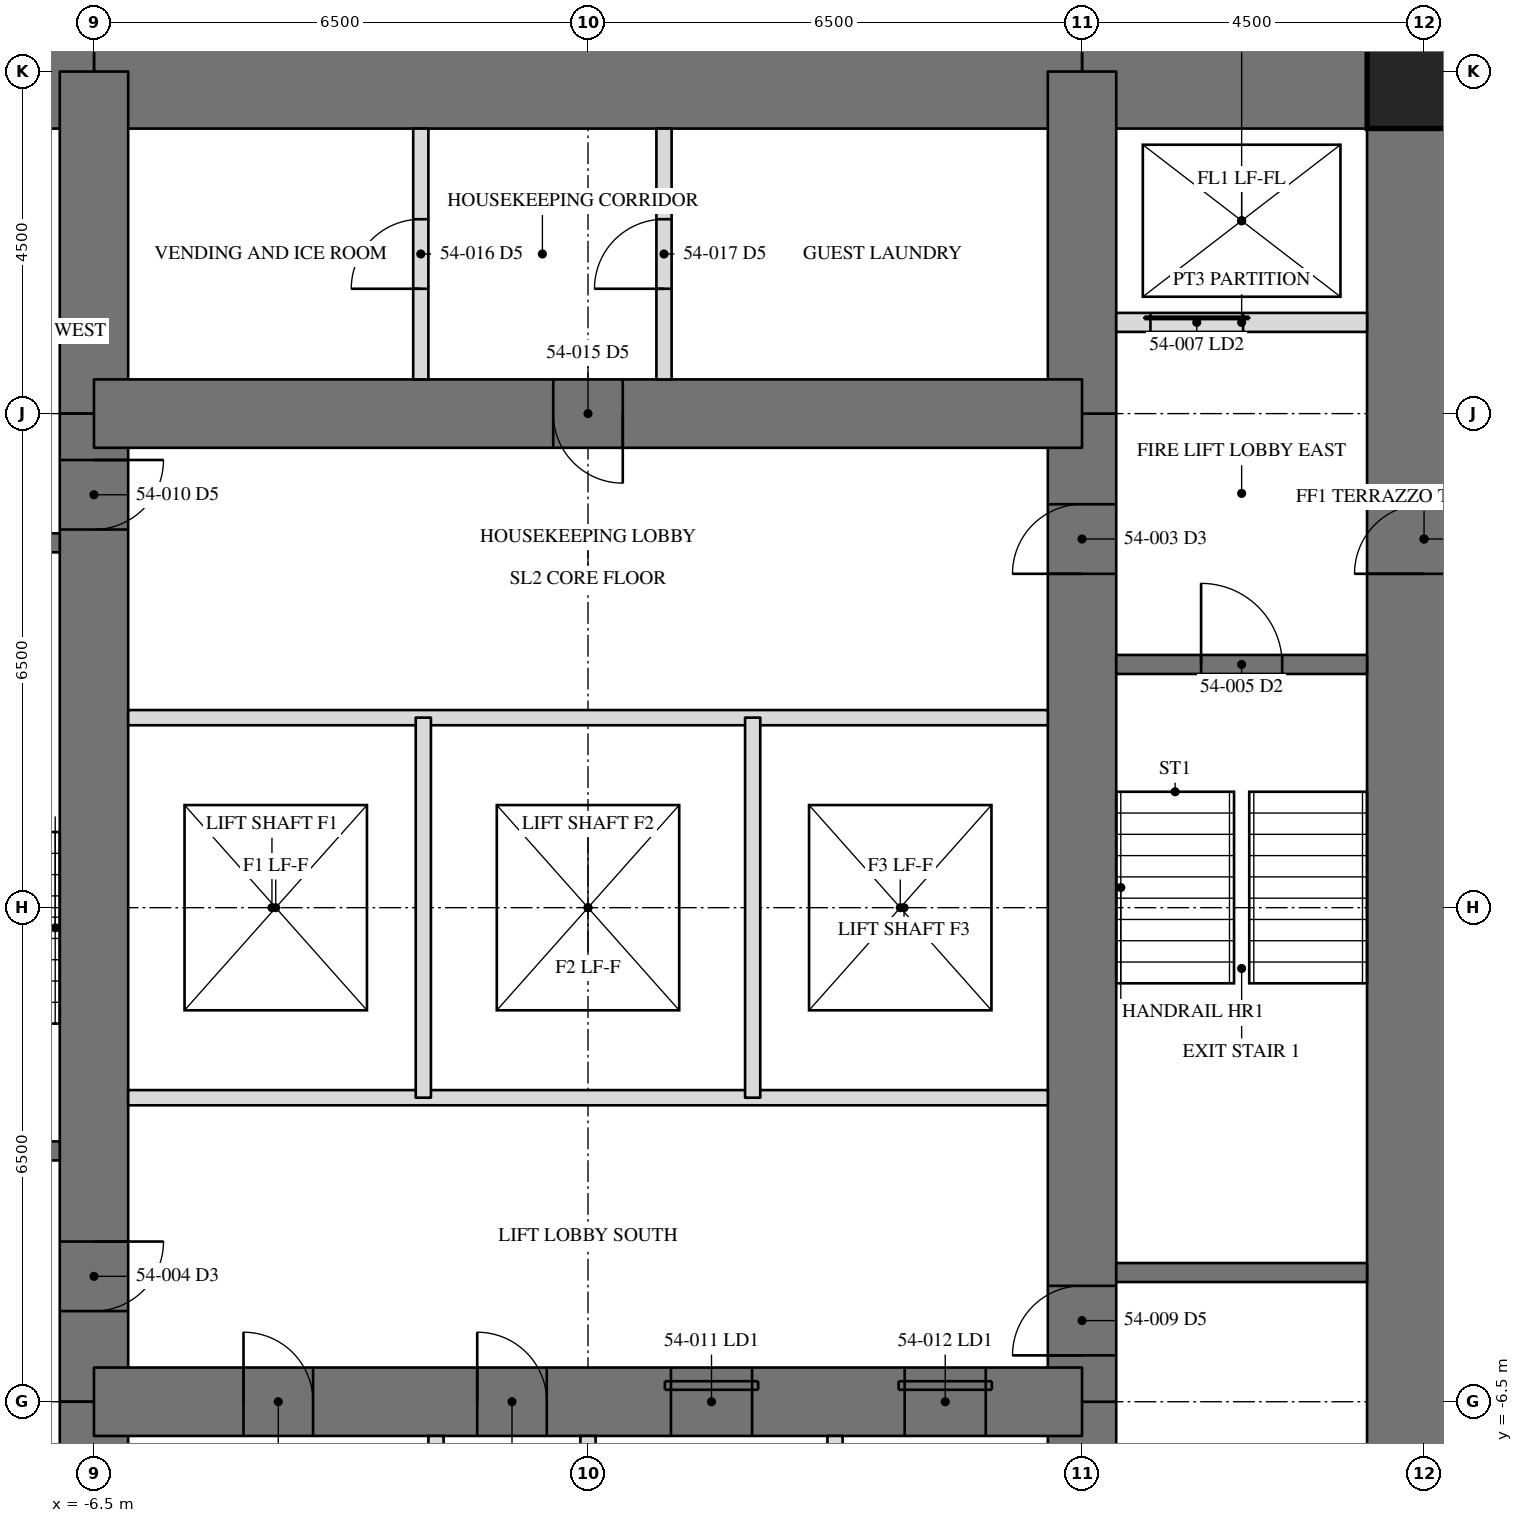
"""IFC4 building model, lengths in metres.
Left out: names, types, materials, properties, quantities, classifications, styles, units other than length and angle.
Written with IfcOpenShell. Run it as: python <this file> out.ifc"""

import sys

from ifc_helpers import new_model, si_unit, direction, frame, frame_2d, origin, origin_2d, place, context, subcontext, project, spatial, rectangle, hollow_rectangle, extrude, element, fill, save


model = new_model("IFC4")
c1 = context("Model", 3, precision=1e-05, world=origin(), true_north=direction((0.0, 1.0)))
c2 = subcontext(c1, "Body", "Model", "MODEL_VIEW")
j1 = project(units=[si_unit("LENGTHUNIT", "METRE"), si_unit("PLANEANGLEUNIT", "RADIAN")], contexts=[c1])
p1 = place(None, origin())
s1 = spatial("IfcSite", under=j1, at=p1, CompositionType="ELEMENT")
p2 = place(p1, origin())
s2 = spatial("IfcBuilding", under=s1, at=p2, CompositionType="ELEMENT")
p3 = place(p2, frame((0.0, 0.0, 225.7)))
s3 = spatial("IfcBuildingStorey", under=s2, at=p3, CompositionType="ELEMENT", Elevation=225.7)
p4 = place(p3, frame((11.0, -11.0, 0.0), z_axis=(0.0, 0.0, 1.0), x_axis=(0.0, 1.0, 0.0)))
e1 = element("IfcWall", 1, at=p4, inside=s3, PredefinedType="SHEAR", context=c2, shape_type="SweptSolid", body=[
    extrude(rectangle(XDim=22.0, YDim=1.5, at=frame_2d((11.0, 0.0))), origin(), (0.0, 0.0, 1.0), 3.5),
])
p5 = place(p4, frame((15.393, 0.0, 0.0)))
e2 = element("IfcOpeningElement", 2, at=p5, cuts=e1, PredefinedType="OPENING", context=c2, shape_type="SweptSolid", body=[
    extrude(rectangle(XDim=0.915, YDim=2.134, at=frame_2d((0.458, 1.067))), frame((0.0, 0.76, 0.0), z_axis=(0.0, -1.0, 0.0), x_axis=(1.0, 0.0, 0.0)), (0.0, 0.0, 1.0), 1.52),
])
p6 = place(p3, frame((11.0, 11.0, 0.0), z_axis=(0.0, 0.0, 1.0), x_axis=(-1.0, 0.0, 0.0)))
e3 = element("IfcWall", 3, at=p6, inside=s3, PredefinedType="SHEAR", context=c2, shape_type="SweptSolid", body=[
    extrude(rectangle(XDim=4.5, YDim=1.5, at=frame_2d((2.25, 0.0))), origin(), (0.0, 0.0, 1.0), 3.5),
])
p7 = place(p3, frame((6.5, 11.0, 0.0), z_axis=(0.0, 0.0, 1.0), x_axis=(-1.0, 0.0, 0.0)))
e4 = element("IfcWall", 4, at=p7, inside=s3, PredefinedType="SHEAR", context=c2, shape_type="SweptSolid", body=[
    extrude(rectangle(XDim=13.0, YDim=1.5, at=frame_2d((6.5, 0.0))), origin(), (0.0, 0.0, 1.0), 3.5),
])
p8 = place(p3, frame((-6.5, 11.0, 0.0), z_axis=(0.0, 0.0, 1.0), x_axis=(-1.0, 0.0, 0.0)))
e5 = element("IfcWall", 5, at=p8, inside=s3, PredefinedType="SHEAR", context=c2, shape_type="SweptSolid", body=[
    extrude(rectangle(XDim=4.5, YDim=1.5, at=frame_2d((2.25, 0.0))), origin(), (0.0, 0.0, 1.0), 3.5),
])
p9 = place(p3, frame((6.5, -11.0, 0.0), z_axis=(0.0, 0.0, 1.0), x_axis=(0.0, 1.0, 0.0)))
e6 = element("IfcWall", 6, at=p9, inside=s3, PredefinedType="SHEAR", context=c2, shape_type="SweptSolid", body=[
    extrude(rectangle(XDim=4.5, YDim=0.9, at=frame_2d((2.25, 0.0))), origin(), (0.0, 0.0, 1.0), 3.5),
])
p10 = place(p3, frame((6.5, -6.5, 0.0), z_axis=(0.0, 0.0, 1.0), x_axis=(0.0, 1.0, 0.0)))
e7 = element("IfcWall", 7, at=p10, inside=s3, PredefinedType="SHEAR", context=c2, shape_type="SweptSolid", body=[
    extrude(rectangle(XDim=13.0, YDim=0.9, at=frame_2d((6.5, 0.0))), origin(), (0.0, 0.0, 1.0), 3.5),
])
p11 = place(p10, frame((10.893, 0.0, 0.0)))
e8 = element("IfcOpeningElement", 8, at=p11, cuts=e7, PredefinedType="OPENING", context=c2, shape_type="SweptSolid", body=[
    extrude(rectangle(XDim=0.915, YDim=2.134, at=frame_2d((0.458, 1.067))), frame((0.0, 0.46, 0.0), z_axis=(0.0, -1.0, 0.0), x_axis=(1.0, 0.0, 0.0)), (0.0, 0.0, 1.0), 0.92),
])
p12 = place(p10, frame((0.61, 0.0, 0.0)))
e9 = element("IfcOpeningElement", 9, at=p12, cuts=e7, PredefinedType="OPENING", context=c2, shape_type="SweptSolid", body=[
    extrude(rectangle(XDim=0.915, YDim=2.134, at=frame_2d((0.458, 1.067))), frame((0.0, 0.46, 0.0), z_axis=(0.0, -1.0, 0.0), x_axis=(1.0, 0.0, 0.0)), (0.0, 0.0, 1.0), 0.92),
])
for number, where, z_axis, x_axis in (
    (10, (6.5, 6.5, 0.0), (0.0, 0.0, 1.0), (0.0, 1.0, 0.0)),
    (11, (-6.5, 11.0, 0.0), (0.0, 0.0, 1.0), (0.0, -1.0, 0.0)),
):
    element("IfcWall", number, at=place(p3, frame(where, z_axis=z_axis, x_axis=x_axis)), inside=s3, PredefinedType="SHEAR", context=c2, shape_type="SweptSolid", body=[
        extrude(rectangle(XDim=4.5, YDim=0.9, at=frame_2d((2.25, 0.0))), origin(), (0.0, 0.0, 1.0), 3.5),
    ])
p13 = place(p3, frame((-6.5, 6.5, 0.0), z_axis=(0.0, 0.0, 1.0), x_axis=(0.0, -1.0, 0.0)))
e12 = element("IfcWall", 12, at=p13, inside=s3, PredefinedType="SHEAR", context=c2, shape_type="SweptSolid", body=[
    extrude(rectangle(XDim=13.0, YDim=0.9, at=frame_2d((6.5, 0.0))), origin(), (0.0, 0.0, 1.0), 3.5),
])
p14 = place(p13, frame((10.893, 0.0, 0.0)))
e13 = element("IfcOpeningElement", 13, at=p14, cuts=e12, PredefinedType="OPENING", context=c2, shape_type="SweptSolid", body=[
    extrude(rectangle(XDim=0.915, YDim=2.134, at=frame_2d((0.458, 1.067))), frame((0.0, 0.46, 0.0), z_axis=(0.0, -1.0, 0.0), x_axis=(1.0, 0.0, 0.0)), (0.0, 0.0, 1.0), 0.92),
])
p15 = place(p13, frame((0.61, 0.0, 0.0)))
e14 = element("IfcOpeningElement", 14, at=p15, cuts=e12, PredefinedType="OPENING", context=c2, shape_type="SweptSolid", body=[
    extrude(rectangle(XDim=0.915, YDim=2.134, at=frame_2d((0.458, 1.067))), frame((0.0, 0.46, 0.0), z_axis=(0.0, -1.0, 0.0), x_axis=(1.0, 0.0, 0.0)), (0.0, 0.0, 1.0), 0.92),
])
p16 = place(p3, frame((-6.5, -6.5, 0.0), z_axis=(0.0, 0.0, 1.0), x_axis=(0.0, -1.0, 0.0)))
e15 = element("IfcWall", 15, at=p16, inside=s3, PredefinedType="SHEAR", context=c2, shape_type="SweptSolid", body=[
    extrude(rectangle(XDim=4.5, YDim=0.9, at=frame_2d((2.25, 0.0))), origin(), (0.0, 0.0, 1.0), 3.5),
])
p17 = place(p3, frame((6.5, 6.5, 0.0), z_axis=(0.0, 0.0, 1.0), x_axis=(-1.0, 0.0, 0.0)))
e16 = element("IfcWall", 16, at=p17, inside=s3, PredefinedType="SHEAR", context=c2, shape_type="SweptSolid", body=[
    extrude(rectangle(XDim=13.0, YDim=0.9, at=frame_2d((6.5, 0.0))), origin(), (0.0, 0.0, 1.0), 3.5),
])
p18 = place(p17, frame((6.042, 0.0, 0.0)))
e17 = element("IfcOpeningElement", 17, at=p18, cuts=e16, PredefinedType="OPENING", context=c2, shape_type="SweptSolid", body=[
    extrude(rectangle(XDim=0.915, YDim=2.134, at=frame_2d((0.458, 1.067))), frame((0.0, 0.46, 0.0), z_axis=(0.0, -1.0, 0.0), x_axis=(1.0, 0.0, 0.0)), (0.0, 0.0, 1.0), 0.92),
])
p19 = place(p3, frame((-6.5, -6.5, 0.0), z_axis=(0.0, 0.0, 1.0), x_axis=(1.0, 0.0, 0.0)))
e18 = element("IfcWall", 18, at=p19, inside=s3, PredefinedType="SHEAR", context=c2, shape_type="SweptSolid", body=[
    extrude(rectangle(XDim=13.0, YDim=0.9, at=frame_2d((6.5, 0.0))), origin(), (0.0, 0.0, 1.0), 3.5),
])
p20 = place(p19, frame((7.592, 0.0, 0.0)))
e19 = element("IfcOpeningElement", 19, at=p20, cuts=e18, PredefinedType="OPENING", context=c2, shape_type="SweptSolid", body=[
    extrude(rectangle(XDim=1.067, YDim=2.134, at=frame_2d((0.533, 1.067))), frame((0.0, 0.46, 0.0), z_axis=(0.0, -1.0, 0.0), x_axis=(1.0, 0.0, 0.0)), (0.0, 0.0, 1.0), 0.92),
])
p21 = place(p19, frame((10.667, 0.0, 0.0)))
e20 = element("IfcOpeningElement", 20, at=p21, cuts=e18, PredefinedType="OPENING", context=c2, shape_type="SweptSolid", body=[
    extrude(rectangle(XDim=1.067, YDim=2.134, at=frame_2d((0.533, 1.067))), frame((0.0, 0.46, 0.0), z_axis=(0.0, -1.0, 0.0), x_axis=(1.0, 0.0, 0.0)), (0.0, 0.0, 1.0), 0.92),
])
p22 = place(p19, frame((1.968, 0.0, 0.0)))
e21 = element("IfcOpeningElement", 21, at=p22, cuts=e18, PredefinedType="OPENING", context=c2, shape_type="SweptSolid", body=[
    extrude(rectangle(XDim=0.915, YDim=2.134, at=frame_2d((0.458, 1.067))), frame((0.0, 0.46, 0.0), z_axis=(0.0, -1.0, 0.0), x_axis=(1.0, 0.0, 0.0)), (0.0, 0.0, 1.0), 0.92),
])
p23 = place(p19, frame((5.042, 0.0, 0.0)))
e22 = element("IfcOpeningElement", 22, at=p23, cuts=e18, PredefinedType="OPENING", context=c2, shape_type="SweptSolid", body=[
    extrude(rectangle(XDim=0.915, YDim=2.134, at=frame_2d((0.458, 1.067))), frame((0.0, 0.46, 0.0), z_axis=(0.0, -1.0, 0.0), x_axis=(1.0, 0.0, 0.0)), (0.0, 0.0, 1.0), 0.92),
])
p24 = place(p3, frame((11.0, 11.0, 0.0), z_axis=(0.0, 0.0, 1.0), x_axis=(1.0, 0.0, 0.0)))
e23 = element("IfcColumn", 23, at=p24, inside=s3, PredefinedType="COLUMN", context=c2, shape_type="SweptSolid", body=[
    extrude(hollow_rectangle(XDim=1.499, YDim=1.499, WallThickness=0.102, at=origin_2d()), origin(), (0.0, 0.0, 1.0), 3.5),
])
for number, where, z_axis, x_axis in (
    (24, (6.95, -4.8, 0.0), (0.0, 0.0, 1.0), (1.0, 0.0, 0.0)),
    (25, (-6.95, 4.8, 0.0), (0.0, 0.0, 1.0), (-1.0, 0.0, 0.0)),
):
    element("IfcWall", number, at=place(p3, frame(where, z_axis=z_axis, x_axis=x_axis)), inside=s3, PredefinedType="SOLIDWALL", context=c2, shape_type="SweptSolid", body=[
        extrude(rectangle(XDim=3.3, YDim=0.25, at=frame_2d((1.65, 0.0))), origin(), (0.0, 0.0, 1.0), 3.31),
    ])
p25 = place(p3, frame((6.95, 3.2, 0.0), z_axis=(0.0, 0.0, 1.0), x_axis=(1.0, 0.0, 0.0)))
e26 = element("IfcWall", 26, at=p25, inside=s3, PredefinedType="SOLIDWALL", context=c2, shape_type="SweptSolid", body=[
    extrude(rectangle(XDim=3.3, YDim=0.25, at=frame_2d((1.65, 0.0))), origin(), (0.0, 0.0, 1.0), 3.31),
])
p26 = place(p25, frame((1.116, 0.0, 0.0)))
e27 = element("IfcOpeningElement", 27, at=p26, cuts=e26, PredefinedType="OPENING", context=c2, shape_type="SweptSolid", body=[
    extrude(rectangle(XDim=1.067, YDim=2.134, at=frame_2d((0.533, 1.067))), frame((0.0, 0.135, 0.0), z_axis=(0.0, -1.0, 0.0), x_axis=(1.0, 0.0, 0.0)), (0.0, 0.0, 1.0), 0.27),
])
p27 = place(p3, frame((-6.95, -3.2, 0.0), z_axis=(0.0, 0.0, 1.0), x_axis=(-1.0, 0.0, 0.0)))
e28 = element("IfcWall", 28, at=p27, inside=s3, PredefinedType="SOLIDWALL", context=c2, shape_type="SweptSolid", body=[
    extrude(rectangle(XDim=3.3, YDim=0.25, at=frame_2d((1.65, 0.0))), origin(), (0.0, 0.0, 1.0), 3.31),
])
p28 = place(p27, frame((1.116, 0.0, 0.0)))
e29 = element("IfcOpeningElement", 29, at=p28, cuts=e28, PredefinedType="OPENING", context=c2, shape_type="SweptSolid", body=[
    extrude(rectangle(XDim=1.067, YDim=2.134, at=frame_2d((0.533, 1.067))), frame((0.0, 0.135, 0.0), z_axis=(0.0, -1.0, 0.0), x_axis=(1.0, 0.0, 0.0)), (0.0, 0.0, 1.0), 0.27),
])
p29 = place(p3, frame((6.95, 7.7, 0.0), z_axis=(0.0, 0.0, 1.0), x_axis=(1.0, 0.0, 0.0)))
e30 = element("IfcWall", 30, at=p29, inside=s3, PredefinedType="PARTITIONING", context=c2, shape_type="SweptSolid", body=[
    extrude(rectangle(XDim=3.3, YDim=0.25, at=frame_2d((1.65, 0.0))), origin(), (0.0, 0.0, 1.0), 3.31),
])
p30 = place(p29, frame((0.45, 0.0, 0.0)))
e31 = element("IfcOpeningElement", 31, at=p30, cuts=e30, PredefinedType="OPENING", context=c2, shape_type="SweptSolid", body=[
    extrude(rectangle(XDim=1.219, YDim=2.134, at=frame_2d((0.609, 1.067))), frame((0.0, 0.135, 0.0), z_axis=(0.0, -1.0, 0.0), x_axis=(1.0, 0.0, 0.0)), (0.0, 0.0, 1.0), 0.27),
])
for number, where, z_axis, x_axis in (
    (32, (-6.05, 2.5, 0.0), (0.0, 0.0, 1.0), (1.0, 0.0, 0.0)),
    (33, (6.05, -2.5, 0.0), (0.0, 0.0, 1.0), (-1.0, 0.0, 0.0)),
):
    element("IfcWall", number, at=place(p3, frame(where, z_axis=z_axis, x_axis=x_axis)), inside=s3, PredefinedType="PARTITIONING", context=c2, shape_type="SweptSolid", body=[
        extrude(rectangle(XDim=12.1, YDim=0.2, at=frame_2d((6.05, 0.0))), origin(), (0.0, 0.0, 1.0), 3.31),
    ])
for number, where, z_axis, x_axis in (
    (34, (0.0, -10.25, 0.0), (0.0, 0.0, 1.0), (0.0, 1.0, 0.0)),
    (35, (3.25, -10.25, 0.0), (0.0, 0.0, 1.0), (0.0, 1.0, 0.0)),
):
    element("IfcWall", number, at=place(p3, frame(where, z_axis=z_axis, x_axis=x_axis)), inside=s3, PredefinedType="PARTITIONING", context=c2, shape_type="SweptSolid", body=[
        extrude(rectangle(XDim=3.3, YDim=0.2, at=frame_2d((1.65, 0.0))), origin(), (0.0, 0.0, 1.0), 3.31),
    ])
for number, where, z_axis, x_axis in (
    (36, (-2.167, -2.5, 0.0), (0.0, 0.0, 1.0), (0.0, 1.0, 0.0)),
    (37, (2.167, -2.5, 0.0), (0.0, 0.0, 1.0), (0.0, 1.0, 0.0)),
):
    element("IfcWall", number, at=place(p3, frame(where, z_axis=z_axis, x_axis=x_axis)), inside=s3, PredefinedType="PARTITIONING", context=c2, shape_type="SweptSolid", body=[
        extrude(rectangle(XDim=5.0, YDim=0.2, at=frame_2d((2.5, 0.0))), origin(), (0.0, 0.0, 1.0), 3.31),
    ])
p31 = place(p3, frame((-2.0, -10.25, 0.0), z_axis=(0.0, 0.0, 1.0), x_axis=(0.0, 1.0, 0.0)))
e38 = element("IfcWall", 38, at=p31, inside=s3, PredefinedType="PARTITIONING", context=c2, shape_type="SweptSolid", body=[
    extrude(rectangle(XDim=3.3, YDim=0.2, at=frame_2d((1.65, 0.0))), origin(), (0.0, 0.0, 1.0), 3.31),
])
p32 = place(p3, frame((-2.2, 6.95, 0.0), z_axis=(0.0, 0.0, 1.0), x_axis=(0.0, 1.0, 0.0)))
e39 = element("IfcWall", 39, at=p32, inside=s3, PredefinedType="PARTITIONING", context=c2, shape_type="SweptSolid", body=[
    extrude(rectangle(XDim=3.3, YDim=0.2, at=frame_2d((1.65, 0.0))), origin(), (0.0, 0.0, 1.0), 3.31),
])
p33 = place(p32, frame((1.192, 0.0, 0.0)))
e40 = element("IfcOpeningElement", 40, at=p33, cuts=e39, PredefinedType="OPENING", context=c2, shape_type="SweptSolid", body=[
    extrude(rectangle(XDim=0.915, YDim=2.134, at=frame_2d((0.458, 1.067))), frame((0.0, 0.11, 0.0), z_axis=(0.0, -1.0, 0.0), x_axis=(1.0, 0.0, 0.0)), (0.0, 0.0, 1.0), 0.22),
])
p34 = place(p3, frame((1.0, 6.95, 0.0), z_axis=(0.0, 0.0, 1.0), x_axis=(0.0, 1.0, 0.0)))
e41 = element("IfcWall", 41, at=p34, inside=s3, PredefinedType="PARTITIONING", context=c2, shape_type="SweptSolid", body=[
    extrude(rectangle(XDim=3.3, YDim=0.2, at=frame_2d((1.65, 0.0))), origin(), (0.0, 0.0, 1.0), 3.31),
])
p35 = place(p34, frame((1.192, 0.0, 0.0)))
e42 = element("IfcOpeningElement", 42, at=p35, cuts=e41, PredefinedType="OPENING", context=c2, shape_type="SweptSolid", body=[
    extrude(rectangle(XDim=0.915, YDim=2.134, at=frame_2d((0.458, 1.067))), frame((0.0, 0.11, 0.0), z_axis=(0.0, -1.0, 0.0), x_axis=(1.0, 0.0, 0.0)), (0.0, 0.0, 1.0), 0.22),
])
p36 = place(p11, origin())
e43 = element("IfcDoor", 43, at=p36, inside=s3, OperationType="SINGLE_SWING_RIGHT", PredefinedType="DOOR", context=c2, shape_type="SweptSolid", body=[
    extrude(rectangle(XDim=0.915, YDim=2.134, at=frame_2d((0.458, 1.067))), frame((0.0, -0.375, 0.0), z_axis=(0.0, -1.0, 0.0), x_axis=(1.0, 0.0, 0.0)), (0.0, 0.0, 1.0), 0.05),
])
fill(e8, e43)
p37 = place(p14, origin())
e44 = element("IfcDoor", 44, at=p37, inside=s3, OperationType="SINGLE_SWING_RIGHT", PredefinedType="DOOR", context=c2, shape_type="SweptSolid", body=[
    extrude(rectangle(XDim=0.915, YDim=2.134, at=frame_2d((0.458, 1.067))), frame((0.0, -0.375, 0.0), z_axis=(0.0, -1.0, 0.0), x_axis=(1.0, 0.0, 0.0)), (0.0, 0.0, 1.0), 0.05),
])
fill(e13, e44)
p38 = place(p26, origin())
e45 = element("IfcDoor", 45, at=p38, inside=s3, OperationType="SINGLE_SWING_LEFT", PredefinedType="DOOR", context=c2, shape_type="SweptSolid", body=[
    extrude(rectangle(XDim=1.067, YDim=2.134, at=frame_2d((0.533, 1.067))), frame((0.0, 0.025, 0.0), z_axis=(0.0, -1.0, 0.0), x_axis=(1.0, 0.0, 0.0)), (0.0, 0.0, 1.0), 0.05),
])
fill(e27, e45)
p39 = place(p30, origin())
e46 = element("IfcDoor", 46, at=p39, inside=s3, OperationType="SLIDING_TO_LEFT", PredefinedType="DOOR", context=c2, shape_type="SweptSolid", body=[
    extrude(rectangle(XDim=1.219, YDim=2.134, at=frame_2d((0.609, 1.067))), frame((0.0, 0.025, 0.0), z_axis=(0.0, -1.0, 0.0), x_axis=(1.0, 0.0, 0.0)), (0.0, 0.0, 1.0), 0.05),
])
fill(e31, e46)
p40 = place(p12, origin())
e47 = element("IfcDoor", 47, at=p40, inside=s3, OperationType="SINGLE_SWING_RIGHT", PredefinedType="DOOR", context=c2, shape_type="SweptSolid", body=[
    extrude(rectangle(XDim=0.915, YDim=2.134, at=frame_2d((0.458, 1.067))), frame((0.0, -0.375, 0.0), z_axis=(0.0, -1.0, 0.0), x_axis=(1.0, 0.0, 0.0)), (0.0, 0.0, 1.0), 0.05),
])
fill(e9, e47)
p41 = place(p15, origin())
e48 = element("IfcDoor", 48, at=p41, inside=s3, OperationType="SINGLE_SWING_RIGHT", PredefinedType="DOOR", context=c2, shape_type="SweptSolid", body=[
    extrude(rectangle(XDim=0.915, YDim=2.134, at=frame_2d((0.458, 1.067))), frame((0.0, -0.375, 0.0), z_axis=(0.0, -1.0, 0.0), x_axis=(1.0, 0.0, 0.0)), (0.0, 0.0, 1.0), 0.05),
])
fill(e14, e48)
p42 = place(p20, origin())
e49 = element("IfcDoor", 49, at=p42, inside=s3, OperationType="SLIDING_TO_LEFT", PredefinedType="DOOR", context=c2, shape_type="SweptSolid", body=[
    extrude(rectangle(XDim=1.067, YDim=2.134, at=frame_2d((0.533, 1.067))), frame((0.0, -0.375, 0.0), z_axis=(0.0, -1.0, 0.0), x_axis=(1.0, 0.0, 0.0)), (0.0, 0.0, 1.0), 0.05),
])
fill(e19, e49)
p43 = place(p21, origin())
e50 = element("IfcDoor", 50, at=p43, inside=s3, OperationType="SLIDING_TO_LEFT", PredefinedType="DOOR", context=c2, shape_type="SweptSolid", body=[
    extrude(rectangle(XDim=1.067, YDim=2.134, at=frame_2d((0.533, 1.067))), frame((0.0, -0.375, 0.0), z_axis=(0.0, -1.0, 0.0), x_axis=(1.0, 0.0, 0.0)), (0.0, 0.0, 1.0), 0.05),
])
fill(e20, e50)
p44 = place(p22, origin())
e51 = element("IfcDoor", 51, at=p44, inside=s3, OperationType="SINGLE_SWING_RIGHT", PredefinedType="DOOR", context=c2, shape_type="SweptSolid", body=[
    extrude(rectangle(XDim=0.915, YDim=2.134, at=frame_2d((0.458, 1.067))), frame((0.0, -0.375, 0.0), z_axis=(0.0, -1.0, 0.0), x_axis=(1.0, 0.0, 0.0)), (0.0, 0.0, 1.0), 0.05),
])
fill(e21, e51)
p45 = place(p23, origin())
e52 = element("IfcDoor", 52, at=p45, inside=s3, OperationType="SINGLE_SWING_RIGHT", PredefinedType="DOOR", context=c2, shape_type="SweptSolid", body=[
    extrude(rectangle(XDim=0.915, YDim=2.134, at=frame_2d((0.458, 1.067))), frame((0.0, -0.375, 0.0), z_axis=(0.0, -1.0, 0.0), x_axis=(1.0, 0.0, 0.0)), (0.0, 0.0, 1.0), 0.05),
])
fill(e22, e52)
p46 = place(p18, origin())
e53 = element("IfcDoor", 53, at=p46, inside=s3, OperationType="SINGLE_SWING_RIGHT", PredefinedType="DOOR", context=c2, shape_type="SweptSolid", body=[
    extrude(rectangle(XDim=0.915, YDim=2.134, at=frame_2d((0.458, 1.067))), frame((0.0, -0.375, 0.0), z_axis=(0.0, -1.0, 0.0), x_axis=(1.0, 0.0, 0.0)), (0.0, 0.0, 1.0), 0.05),
])
fill(e17, e53)
p47 = place(p33, origin())
e54 = element("IfcDoor", 54, at=p47, inside=s3, OperationType="SINGLE_SWING_RIGHT", PredefinedType="DOOR", context=c2, shape_type="SweptSolid", body=[
    extrude(rectangle(XDim=0.915, YDim=2.134, at=frame_2d((0.458, 1.067))), frame((0.0, 0.025, 0.0), z_axis=(0.0, -1.0, 0.0), x_axis=(1.0, 0.0, 0.0)), (0.0, 0.0, 1.0), 0.05),
])
fill(e40, e54)
p48 = place(p35, origin())
e55 = element("IfcDoor", 55, at=p48, inside=s3, OperationType="SINGLE_SWING_RIGHT", PredefinedType="DOOR", context=c2, shape_type="SweptSolid", body=[
    extrude(rectangle(XDim=0.915, YDim=2.134, at=frame_2d((0.458, 1.067))), frame((0.0, 0.025, 0.0), z_axis=(0.0, -1.0, 0.0), x_axis=(1.0, 0.0, 0.0)), (0.0, 0.0, 1.0), 0.05),
])
fill(e42, e55)
save(model, sys.argv[1])
